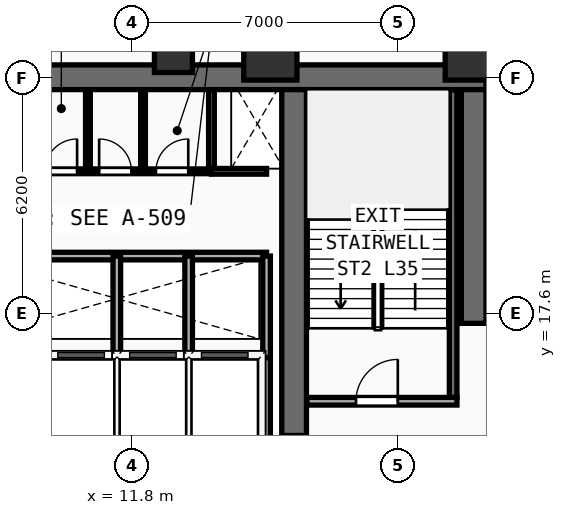
"""IFC4 building model, lengths in metres.
Left out: names, types, materials, properties, quantities, classifications, styles, units other than length and angle.
Written with IfcOpenShell. Run it as: python <this file> out.ifc"""

import sys

from ifc_helpers import new_model, si_unit, direction, frame, frame_2d, origin, origin_2d, place, context, subcontext, project, spatial, rectangle, extrude, element, fill, save


model = new_model("IFC4")
c1 = context("Model", 3, precision=1e-05, world=origin(), true_north=direction((0.0, 1.0)))
c2 = subcontext(c1, "Body", "Model", "MODEL_VIEW")
j1 = project(units=[si_unit("LENGTHUNIT", "METRE"), si_unit("PLANEANGLEUNIT", "RADIAN")], contexts=[c1])
p1 = place(None, origin())
s1 = spatial("IfcSite", under=j1, at=p1, CompositionType="ELEMENT")
p2 = place(p1, origin())
s2 = spatial("IfcBuilding", under=s1, at=p2, CompositionType="ELEMENT")
p3 = place(p2, frame((0.0, 0.0, 137.3)))
s3 = spatial("IfcBuildingStorey", under=s2, at=p3, CompositionType="ELEMENT", Elevation=137.3)
p4 = place(p3, frame((7.125, 23.825, 0.0), z_axis=(0.0, 0.0, 1.0), x_axis=(1.0, 0.0, 0.0)))
e1 = element("IfcWall", 1, at=p4, inside=s3, PredefinedType="SHEAR", context=c2, shape_type="SweptSolid", body=[
    extrude(rectangle(XDim=14.0, YDim=0.65, at=frame_2d((7.0, 0.0))), origin(), (0.0, 0.0, 1.0), 3.42),
])
p5 = place(p3, frame((20.8, 17.35, 0.0), z_axis=(0.0, 0.0, 1.0), x_axis=(0.0, 1.0, 0.0)))
e2 = element("IfcWall", 2, at=p5, inside=s3, PredefinedType="SHEAR", context=c2, shape_type="SweptSolid", body=[
    extrude(rectangle(XDim=6.15, YDim=0.65, at=frame_2d((3.075, 0.0))), origin(), (0.0, 0.0, 1.0), 3.42),
])
p6 = place(p3, frame((16.075, 14.4, 0.0), z_axis=(0.0, 0.0, 1.0), x_axis=(0.0, 1.0, 0.0)))
e3 = element("IfcWall", 3, at=p6, inside=s3, PredefinedType="SHEAR", context=c2, shape_type="SweptSolid", body=[
    extrude(rectangle(XDim=9.1, YDim=0.65, at=frame_2d((4.55, 0.0))), origin(), (0.0, 0.0, 1.0), 3.42),
])
for number, where, z_axis, x_axis in (
    (4, (15.45, 24.45, 0.0), (0.0, 0.0, 1.0), (1.0, 0.0, 0.0)),
    (5, (20.75, 24.45, 0.0), (0.0, 0.0, 1.0), (1.0, 0.0, 0.0)),
):
    element("IfcColumn", number, at=place(p3, frame(where, z_axis=z_axis, x_axis=x_axis)), inside=s3, PredefinedType="COLUMN", context=c2, shape_type="SweptSolid", body=[
        extrude(rectangle(XDim=1.4, YDim=1.4, at=origin_2d()), origin(), (0.0, 0.0, 1.0), 3.42),
    ])
p7 = place(p3, frame((12.9, 24.45, 0.0), z_axis=(0.0, 0.0, 1.0), x_axis=(1.0, 0.0, 0.0)))
e6 = element("IfcColumn", 6, at=p7, inside=s3, PredefinedType="COLUMN", context=c2, shape_type="SweptSolid", body=[
    extrude(rectangle(XDim=1.0, YDim=1.0, at=origin_2d()), origin(), (0.0, 0.0, 1.0), 3.42),
])
p8 = place(p3, frame((20.26, 15.4, 0.0), z_axis=(0.0, 0.0, 1.0), x_axis=(0.0, 1.0, 0.0)))
e7 = element("IfcWall", 7, at=p8, inside=s3, PredefinedType="SHEAR", context=c2, shape_type="SweptSolid", body=[
    extrude(rectangle(XDim=8.09, YDim=0.2, at=frame_2d((4.045, 0.0))), origin(), (0.0, 0.0, 1.0), 3.42),
])
p9 = place(p3, frame((16.41, 15.3, 0.0), z_axis=(0.0, 0.0, 1.0), x_axis=(1.0, 0.0, 0.0)))
e8 = element("IfcWall", 8, at=p9, inside=s3, PredefinedType="PARTITIONING", context=c2, shape_type="SweptSolid", body=[
    extrude(rectangle(XDim=3.95, YDim=0.2, at=frame_2d((1.975, 0.0))), origin(), (0.0, 0.0, 1.0), 3.42),
])
p10 = place(p9, frame((1.294, 0.0, 0.0)))
e9 = element("IfcOpeningElement", 9, at=p10, cuts=e8, PredefinedType="OPENING", context=c2, shape_type="SweptSolid", body=[
    extrude(rectangle(XDim=1.1, YDim=2.2, at=frame_2d((0.55, 1.1))), frame((0.0, 0.11, 0.0), z_axis=(0.0, -1.0, 0.0), x_axis=(1.0, 0.0, 0.0)), (0.0, 0.0, 1.0), 0.22),
])
p11 = place(p3, frame((7.5, 16.45, 0.0), z_axis=(0.0, 0.0, 1.0), x_axis=(1.0, 0.0, 0.0)))
e10 = element("IfcWall", 10, at=p11, inside=s3, PredefinedType="PARTITIONING", context=c2, shape_type="SweptSolid", body=[
    extrude(rectangle(XDim=7.85, YDim=0.2, at=frame_2d((3.925, 0.0))), origin(), (0.0, 0.0, 1.0), 3.42),
])
for number, where, z_axis, x_axis in (
    (11, (15.35, 14.22, 0.0), (0.0, 0.0, 1.0), (0.0, 1.0, 0.0)),
    (12, (11.41, 14.22, 0.0), (0.0, 0.0, 1.0), (0.0, 1.0, 0.0)),
    (13, (13.3, 14.22, 0.0), (0.0, 0.0, 1.0), (0.0, 1.0, 0.0)),
):
    element("IfcWall", number, at=place(p3, frame(where, z_axis=z_axis, x_axis=x_axis)), inside=s3, PredefinedType="PARTITIONING", context=c2, shape_type="SweptSolid", body=[
        extrude(rectangle(XDim=2.23, YDim=0.2, at=frame_2d((1.115, 0.0))), origin(), (0.0, 0.0, 1.0), 3.42),
    ])
p12 = place(p3, frame((7.5, 19.12, 0.0), z_axis=(0.0, 0.0, 1.0), x_axis=(1.0, 0.0, 0.0)))
e14 = element("IfcWall", 14, at=p12, inside=s3, PredefinedType="PARTITIONING", context=c2, shape_type="SweptSolid", body=[
    extrude(rectangle(XDim=7.85, YDim=0.2, at=frame_2d((3.925, 0.0))), origin(), (0.0, 0.0, 1.0), 3.42),
])
for number, where, z_axis, x_axis in (
    (15, (15.35, 16.45, 0.0), (0.0, 0.0, 1.0), (0.0, 1.0, 0.0)),
    (16, (11.41, 16.45, 0.0), (0.0, 0.0, 1.0), (0.0, 1.0, 0.0)),
    (17, (13.3, 16.45, 0.0), (0.0, 0.0, 1.0), (0.0, 1.0, 0.0)),
):
    element("IfcWall", number, at=place(p3, frame(where, z_axis=z_axis, x_axis=x_axis)), inside=s3, PredefinedType="PARTITIONING", context=c2, shape_type="SweptSolid", body=[
        extrude(rectangle(XDim=2.67, YDim=0.2, at=frame_2d((1.335, 0.0))), origin(), (0.0, 0.0, 1.0), 3.42),
    ])
p13 = place(p3, frame((13.9, 21.35, 0.0), z_axis=(0.0, 0.0, 1.0), x_axis=(0.0, 1.0, 0.0)))
e18 = element("IfcWall", 18, at=p13, inside=s3, PredefinedType="PARTITIONING", context=c2, shape_type="SweptSolid", body=[
    extrude(rectangle(XDim=2.13, YDim=0.15, at=frame_2d((1.065, 0.0))), origin(), (0.0, 0.0, 1.0), 3.42),
])
p14 = place(p3, frame((13.9, 21.35, 0.0), z_axis=(0.0, 0.0, 1.0), x_axis=(1.0, 0.0, 0.0)))
e19 = element("IfcWall", 19, at=p14, inside=s3, PredefinedType="PARTITIONING", context=c2, shape_type="SweptSolid", body=[
    extrude(rectangle(XDim=1.45, YDim=0.15, at=frame_2d((0.725, 0.0))), origin(), (0.0, 0.0, 1.0), 3.42),
])
p15 = place(p3, frame((9.25, 21.35, 0.0), z_axis=(0.0, 0.0, 1.0), x_axis=(1.0, 0.0, 0.0)))
e20 = element("IfcWall", 20, at=p15, inside=s3, PredefinedType="PARTITIONING", context=c2, shape_type="SweptSolid", body=[
    extrude(rectangle(XDim=4.65, YDim=0.125, at=frame_2d((2.325, 0.0))), origin(), (0.0, 0.0, 1.0), 3.42),
])
p16 = place(p15, frame((0.265, 0.0, 0.0)))
e21 = element("IfcOpeningElement", 21, at=p16, cuts=e20, PredefinedType="OPENING", context=c2, shape_type="SweptSolid", body=[
    extrude(rectangle(XDim=0.85, YDim=2.15, at=frame_2d((0.425, 1.075))), frame((0.0, 0.073, 0.0), z_axis=(0.0, -1.0, 0.0), x_axis=(1.0, 0.0, 0.0)), (0.0, 0.0, 1.0), 0.145),
])
p17 = place(p15, frame((1.695, 0.0, 0.0)))
e22 = element("IfcOpeningElement", 22, at=p17, cuts=e20, PredefinedType="OPENING", context=c2, shape_type="SweptSolid", body=[
    extrude(rectangle(XDim=0.85, YDim=2.15, at=frame_2d((0.425, 1.075))), frame((0.0, 0.073, 0.0), z_axis=(0.0, -1.0, 0.0), x_axis=(1.0, 0.0, 0.0)), (0.0, 0.0, 1.0), 0.145),
])
p18 = place(p15, frame((3.19, 0.0, 0.0)))
e23 = element("IfcOpeningElement", 23, at=p18, cuts=e20, PredefinedType="OPENING", context=c2, shape_type="SweptSolid", body=[
    extrude(rectangle(XDim=0.85, YDim=2.15, at=frame_2d((0.425, 1.075))), frame((0.0, 0.073, 0.0), z_axis=(0.0, -1.0, 0.0), x_axis=(1.0, 0.0, 0.0)), (0.0, 0.0, 1.0), 0.145),
])
for number, where, z_axis, x_axis in (
    (24, (10.65, 21.35, 0.0), (0.0, 0.0, 1.0), (0.0, 1.0, 0.0)),
    (25, (12.1, 21.35, 0.0), (0.0, 0.0, 1.0), (0.0, 1.0, 0.0)),
):
    element("IfcWall", number, at=place(p3, frame(where, z_axis=z_axis, x_axis=x_axis)), inside=s3, PredefinedType="PARTITIONING", context=c2, shape_type="SweptSolid", body=[
        extrude(rectangle(XDim=2.1, YDim=0.125, at=frame_2d((1.05, 0.0))), origin(), (0.0, 0.0, 1.0), 3.42),
    ])
p19 = place(p10, origin())
e26 = element("IfcDoor", 26, at=p19, inside=s3, OperationType="SINGLE_SWING_RIGHT", PredefinedType="DOOR", context=c2, shape_type="SweptSolid", body=[
    extrude(rectangle(XDim=1.1, YDim=2.2, at=frame_2d((0.55, 1.1))), frame((0.0, 0.025, 0.0), z_axis=(0.0, -1.0, 0.0), x_axis=(1.0, 0.0, 0.0)), (0.0, 0.0, 1.0), 0.05),
])
fill(e9, e26)
p20 = place(p16, origin())
e27 = element("IfcDoor", 27, at=p20, inside=s3, OperationType="SINGLE_SWING_RIGHT", PredefinedType="DOOR", context=c2, shape_type="SweptSolid", body=[
    extrude(rectangle(XDim=0.85, YDim=2.15, at=frame_2d((0.425, 1.075))), frame((0.0, 0.025, 0.0), z_axis=(0.0, -1.0, 0.0), x_axis=(1.0, 0.0, 0.0)), (0.0, 0.0, 1.0), 0.05),
])
fill(e21, e27)
p21 = place(p17, origin())
e28 = element("IfcDoor", 28, at=p21, inside=s3, OperationType="SINGLE_SWING_LEFT", PredefinedType="DOOR", context=c2, shape_type="SweptSolid", body=[
    extrude(rectangle(XDim=0.85, YDim=2.15, at=frame_2d((0.425, 1.075))), frame((0.0, 0.025, 0.0), z_axis=(0.0, -1.0, 0.0), x_axis=(1.0, 0.0, 0.0)), (0.0, 0.0, 1.0), 0.05),
])
fill(e22, e28)
p22 = place(p18, origin())
e29 = element("IfcDoor", 29, at=p22, inside=s3, OperationType="SINGLE_SWING_RIGHT", PredefinedType="DOOR", context=c2, shape_type="SweptSolid", body=[
    extrude(rectangle(XDim=0.85, YDim=2.15, at=frame_2d((0.425, 1.075))), frame((0.0, 0.025, 0.0), z_axis=(0.0, -1.0, 0.0), x_axis=(1.0, 0.0, 0.0)), (0.0, 0.0, 1.0), 0.05),
])
fill(e23, e29)
save(model, sys.argv[1])
